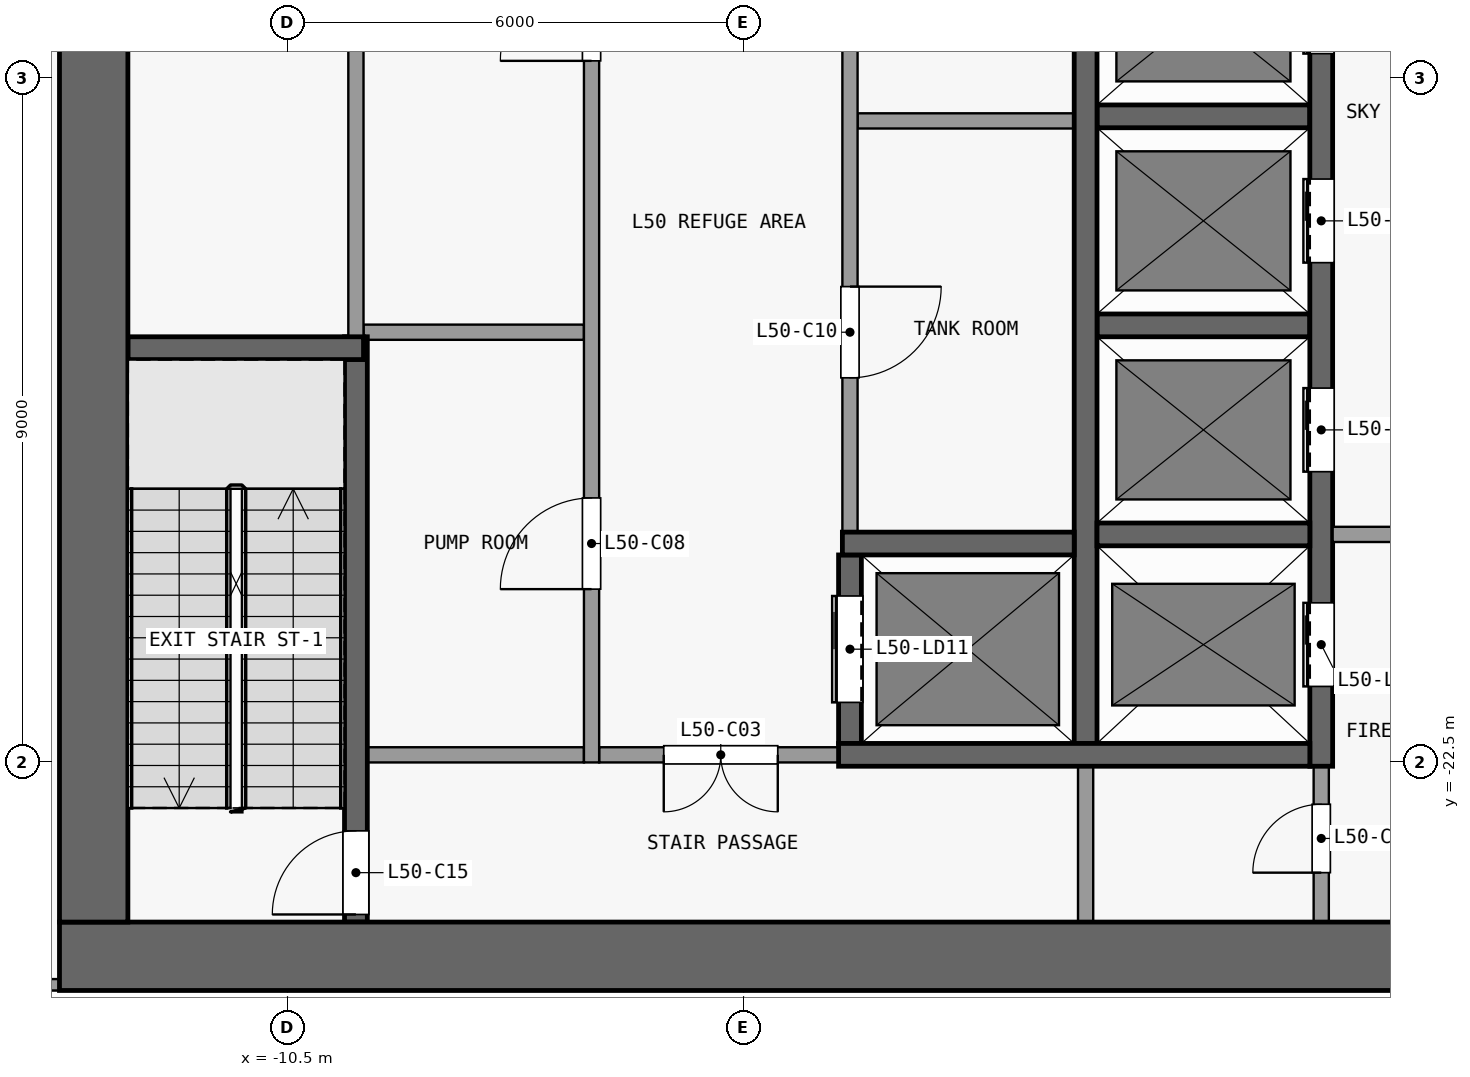
"""IFC4 building model, lengths in metres.
Left out: names, types, materials, properties, quantities, classifications, styles, units other than length and angle.
Written with IfcOpenShell. Run it as: python <this file> out.ifc"""

import sys

from ifc_helpers import new_model, si_unit, direction, frame, frame_2d, origin, place, context, subcontext, project, spatial, rectangle, extrude, element, fill, save


model = new_model("IFC4")
c1 = context("Model", 3, precision=1e-05, world=origin(), true_north=direction((0.0, 1.0)))
c2 = subcontext(c1, "Body", "Model", "MODEL_VIEW")
j1 = project(units=[si_unit("LENGTHUNIT", "METRE"), si_unit("PLANEANGLEUNIT", "RADIAN")], contexts=[c1])
p1 = place(None, origin())
s1 = spatial("IfcSite", under=j1, at=p1, CompositionType="ELEMENT")
p2 = place(p1, origin())
s2 = spatial("IfcBuilding", under=s1, at=p2, CompositionType="ELEMENT")
p3 = place(p2, frame((0.0, 0.0, 199.7)))
s3 = spatial("IfcBuildingStorey", under=s2, at=p3, CompositionType="ELEMENT", Elevation=199.7)
p4 = place(p3, frame((-13.5, -25.05, 0.0), z_axis=(0.0, 0.0, 1.0), x_axis=(1.0, 0.0, 0.0)))
e1 = element("IfcWall", 1, at=p4, inside=s3, PredefinedType="SHEAR", context=c2, shape_type="SweptSolid", body=[
    extrude(rectangle(XDim=27.0, YDim=0.9, at=frame_2d((13.5, 0.0))), origin(), (0.0, 0.0, 1.0), 5.0),
])
p5 = place(p3, frame((-13.05, -24.6, 0.0), z_axis=(0.0, 0.0, 1.0), x_axis=(0.0, 1.0, 0.0)))
e2 = element("IfcWall", 2, at=p5, inside=s3, PredefinedType="SHEAR", context=c2, shape_type="SweptSolid", body=[
    extrude(rectangle(XDim=16.1, YDim=0.9, at=frame_2d((8.05, 0.0))), origin(), (0.0, 0.0, 1.0), 5.0),
])
p6 = place(p3, frame((-9.45, -22.4, 0.0), z_axis=(0.0, 0.0, 1.0), x_axis=(1.0, 0.0, 0.0)))
e3 = element("IfcWall", 3, at=p6, inside=s3, PredefinedType="PARTITIONING", context=c2, shape_type="SweptSolid", body=[
    extrude(rectangle(XDim=2.85, YDim=0.2, at=frame_2d((1.425, 0.0))), origin(), (0.0, 0.0, 1.0), 5.0),
])
p7 = place(p3, frame((-3.25, -22.4, 0.0), z_axis=(0.0, 0.0, 1.0), x_axis=(-1.0, 0.0, 0.0)))
e4 = element("IfcWall", 4, at=p7, inside=s3, PredefinedType="PARTITIONING", context=c2, shape_type="SweptSolid", body=[
    extrude(rectangle(XDim=3.15, YDim=0.2, at=frame_2d((1.575, 0.0))), origin(), (0.0, 0.0, 1.0), 5.0),
])
p8 = place(p7, frame((0.8, 0.0, 0.0)))
e5 = element("IfcOpeningElement", 5, at=p8, cuts=e4, PredefinedType="OPENING", context=c2, shape_type="SweptSolid", body=[
    extrude(rectangle(XDim=1.5, YDim=2.1, at=frame_2d((0.75, 1.05))), frame((0.0, 0.11, 0.0), z_axis=(0.0, -1.0, 0.0), x_axis=(1.0, 0.0, 0.0)), (0.0, 0.0, 1.0), 0.22),
])
p9 = place(p3, frame((-3.25, -22.4, 0.0), z_axis=(0.0, 0.0, 1.0), x_axis=(1.0, 0.0, 0.0)))
e6 = element("IfcWall", 6, at=p9, inside=s3, PredefinedType="SHEAR", context=c2, shape_type="SweptSolid", body=[
    extrude(rectangle(XDim=6.2, YDim=0.3, at=frame_2d((3.1, 0.0))), origin(), (0.0, 0.0, 1.0), 5.0),
])
p10 = place(p3, frame((-3.2, -19.62, 0.0), z_axis=(0.0, 0.0, 1.0), x_axis=(1.0, 0.0, 0.0)))
e7 = element("IfcWall", 7, at=p10, inside=s3, PredefinedType="SHEAR", context=c2, shape_type="SweptSolid", body=[
    extrude(rectangle(XDim=3.05, YDim=0.3, at=frame_2d((1.525, 0.0))), origin(), (0.0, 0.0, 1.0), 5.0),
])
p11 = place(p3, frame((0.15, -19.5, 0.0), z_axis=(0.0, 0.0, 1.0), x_axis=(1.0, 0.0, 0.0)))
e8 = element("IfcWall", 8, at=p11, inside=s3, PredefinedType="SHEAR", context=c2, shape_type="SweptSolid", body=[
    extrude(rectangle(XDim=2.8, YDim=0.3, at=frame_2d((1.4, 0.0))), origin(), (0.0, 0.0, 1.0), 5.0),
])
p12 = place(p3, frame((6.35, -19.5, 0.0), z_axis=(0.0, 0.0, 1.0), x_axis=(-1.0, 0.0, 0.0)))
e9 = element("IfcWall", 9, at=p12, inside=s3, PredefinedType="PARTITIONING", context=c2, shape_type="SweptSolid", body=[
    extrude(rectangle(XDim=3.1, YDim=0.2, at=frame_2d((1.55, 0.0))), origin(), (0.0, 0.0, 1.0), 5.0),
])
p13 = place(p12, frame((0.8, 0.0, 0.0)))
e10 = element("IfcOpeningElement", 10, at=p13, cuts=e9, PredefinedType="OPENING", context=c2, shape_type="SweptSolid", body=[
    extrude(rectangle(XDim=1.5, YDim=2.1, at=frame_2d((0.75, 1.05))), frame((0.0, 0.11, 0.0), z_axis=(0.0, -1.0, 0.0), x_axis=(1.0, 0.0, 0.0)), (0.0, 0.0, 1.0), 0.22),
])
p14 = place(p3, frame((-12.6, -17.05, 0.0), z_axis=(0.0, 0.0, 1.0), x_axis=(1.0, 0.0, 0.0)))
e11 = element("IfcWall", 11, at=p14, inside=s3, PredefinedType="SHEAR", context=c2, shape_type="SweptSolid", body=[
    extrude(rectangle(XDim=3.1, YDim=0.3, at=frame_2d((1.55, 0.0))), origin(), (0.0, 0.0, 1.0), 5.0),
])
p15 = place(p3, frame((-9.5, -16.84, 0.0), z_axis=(0.0, 0.0, 1.0), x_axis=(1.0, 0.0, 0.0)))
e12 = element("IfcWall", 12, at=p15, inside=s3, PredefinedType="PARTITIONING", context=c2, shape_type="SweptSolid", body=[
    extrude(rectangle(XDim=2.9, YDim=0.2, at=frame_2d((1.45, 0.0))), origin(), (0.0, 0.0, 1.0), 5.0),
])
p16 = place(p3, frame((0.15, -16.75, 0.0), z_axis=(0.0, 0.0, 1.0), x_axis=(1.0, 0.0, 0.0)))
e13 = element("IfcWall", 13, at=p16, inside=s3, PredefinedType="SHEAR", context=c2, shape_type="SweptSolid", body=[
    extrude(rectangle(XDim=2.8, YDim=0.3, at=frame_2d((1.4, 0.0))), origin(), (0.0, 0.0, 1.0), 5.0),
])
p17 = place(p3, frame((-3.0, -14.06, 0.0), z_axis=(0.0, 0.0, 1.0), x_axis=(1.0, 0.0, 0.0)))
e14 = element("IfcWall", 14, at=p17, inside=s3, PredefinedType="PARTITIONING", context=c2, shape_type="SweptSolid", body=[
    extrude(rectangle(XDim=2.85, YDim=0.2, at=frame_2d((1.425, 0.0))), origin(), (0.0, 0.0, 1.0), 5.0),
])
p18 = place(p3, frame((0.15, -14.0, 0.0), z_axis=(0.0, 0.0, 1.0), x_axis=(1.0, 0.0, 0.0)))
e15 = element("IfcWall", 15, at=p18, inside=s3, PredefinedType="SHEAR", context=c2, shape_type="SweptSolid", body=[
    extrude(rectangle(XDim=2.8, YDim=0.3, at=frame_2d((1.4, 0.0))), origin(), (0.0, 0.0, 1.0), 5.0),
])
p19 = place(p3, frame((-9.6, -24.6, 0.0), z_axis=(0.0, 0.0, 1.0), x_axis=(0.0, 1.0, 0.0)))
e16 = element("IfcWall", 16, at=p19, inside=s3, PredefinedType="SHEAR", context=c2, shape_type="SweptSolid", body=[
    extrude(rectangle(XDim=7.7, YDim=0.3, at=frame_2d((3.85, 0.0))), origin(), (0.0, 0.0, 1.0), 5.0),
])
p20 = place(p19, frame((0.1, 0.0, 0.0)))
e17 = element("IfcOpeningElement", 17, at=p20, cuts=e16, PredefinedType="OPENING", context=c2, shape_type="SweptSolid", body=[
    extrude(rectangle(XDim=1.1, YDim=2.1, at=frame_2d((0.55, 1.05))), frame((0.0, 0.16, 0.0), z_axis=(0.0, -1.0, 0.0), x_axis=(1.0, 0.0, 0.0)), (0.0, 0.0, 1.0), 0.32),
])
p21 = place(p3, frame((-9.6, -16.9, 0.0), z_axis=(0.0, 0.0, 1.0), x_axis=(0.0, 1.0, 0.0)))
e18 = element("IfcWall", 18, at=p21, inside=s3, PredefinedType="PARTITIONING", context=c2, shape_type="SweptSolid", body=[
    extrude(rectangle(XDim=8.4, YDim=0.2, at=frame_2d((4.2, 0.0))), origin(), (0.0, 0.0, 1.0), 5.0),
])
p22 = place(p3, frame((-6.5, -22.5, 0.0), z_axis=(0.0, 0.0, 1.0), x_axis=(0.0, 1.0, 0.0)))
e19 = element("IfcWall", 19, at=p22, inside=s3, PredefinedType="PARTITIONING", context=c2, shape_type="SweptSolid", body=[
    extrude(rectangle(XDim=14.0, YDim=0.2, at=frame_2d((7.0, 0.0))), origin(), (0.0, 0.0, 1.0), 5.0),
])
p23 = place(p22, frame((2.28, 0.0, 0.0)))
e20 = element("IfcOpeningElement", 20, at=p23, cuts=e19, PredefinedType="OPENING", context=c2, shape_type="SweptSolid", body=[
    extrude(rectangle(XDim=1.2, YDim=2.1, at=frame_2d((0.6, 1.05))), frame((0.0, 0.11, 0.0), z_axis=(0.0, -1.0, 0.0), x_axis=(1.0, 0.0, 0.0)), (0.0, 0.0, 1.0), 0.22),
])
p24 = place(p22, frame((9.23, 0.0, 0.0)))
e21 = element("IfcOpeningElement", 21, at=p24, cuts=e19, PredefinedType="OPENING", context=c2, shape_type="SweptSolid", body=[
    extrude(rectangle(XDim=1.2, YDim=2.1, at=frame_2d((0.6, 1.05))), frame((0.0, 0.11, 0.0), z_axis=(0.0, -1.0, 0.0), x_axis=(1.0, 0.0, 0.0)), (0.0, 0.0, 1.0), 0.22),
])
p25 = place(p3, frame((-3.1, -22.25, 0.0), z_axis=(0.0, 0.0, 1.0), x_axis=(0.0, 1.0, 0.0)))
e22 = element("IfcWall", 22, at=p25, inside=s3, PredefinedType="SHEAR", context=c2, shape_type="SweptSolid", body=[
    extrude(rectangle(XDim=2.48, YDim=0.3, at=frame_2d((1.24, 0.0))), origin(), (0.0, 0.0, 1.0), 5.0),
])
p26 = place(p25, frame((0.54, 0.0, 0.0)))
e23 = element("IfcOpeningElement", 23, at=p26, cuts=e22, PredefinedType="OPENING", context=c2, shape_type="SweptSolid", body=[
    extrude(rectangle(XDim=1.4, YDim=2.1, at=frame_2d((0.7, 1.05))), frame((0.0, 0.16, 0.0), z_axis=(0.0, -1.0, 0.0), x_axis=(1.0, 0.0, 0.0)), (0.0, 0.0, 1.0), 0.32),
])
p27 = place(p3, frame((-3.1, -8.5, 0.0), z_axis=(0.0, 0.0, 1.0), x_axis=(0.0, -1.0, 0.0)))
e24 = element("IfcWall", 24, at=p27, inside=s3, PredefinedType="PARTITIONING", context=c2, shape_type="SweptSolid", body=[
    extrude(rectangle(XDim=10.97, YDim=0.2, at=frame_2d((5.485, 0.0))), origin(), (0.0, 0.0, 1.0), 5.0),
])
p28 = place(p27, frame((7.74, 0.0, 0.0)))
e25 = element("IfcOpeningElement", 25, at=p28, cuts=e24, PredefinedType="OPENING", context=c2, shape_type="SweptSolid", body=[
    extrude(rectangle(XDim=1.2, YDim=2.1, at=frame_2d((0.6, 1.05))), frame((0.0, 0.11, 0.0), z_axis=(0.0, -1.0, 0.0), x_axis=(1.0, 0.0, 0.0)), (0.0, 0.0, 1.0), 0.22),
])
p29 = place(p27, frame((2.18, 0.0, 0.0)))
e26 = element("IfcOpeningElement", 26, at=p29, cuts=e24, PredefinedType="OPENING", context=c2, shape_type="SweptSolid", body=[
    extrude(rectangle(XDim=1.2, YDim=2.1, at=frame_2d((0.6, 1.05))), frame((0.0, 0.11, 0.0), z_axis=(0.0, -1.0, 0.0), x_axis=(1.0, 0.0, 0.0)), (0.0, 0.0, 1.0), 0.22),
])
p30 = place(p3, frame((0.0, -24.6, 0.0), z_axis=(0.0, 0.0, 1.0), x_axis=(0.0, 1.0, 0.0)))
e27 = element("IfcWall", 27, at=p30, inside=s3, PredefinedType="PARTITIONING", context=c2, shape_type="SweptSolid", body=[
    extrude(rectangle(XDim=2.05, YDim=0.2, at=frame_2d((1.025, 0.0))), origin(), (0.0, 0.0, 1.0), 5.0),
])
p31 = place(p3, frame((0.0, -22.25, 0.0), z_axis=(0.0, 0.0, 1.0), x_axis=(0.0, 1.0, 0.0)))
e28 = element("IfcWall", 28, at=p31, inside=s3, PredefinedType="SHEAR", context=c2, shape_type="SweptSolid", body=[
    extrude(rectangle(XDim=13.75, YDim=0.3, at=frame_2d((6.875, 0.0))), origin(), (0.0, 0.0, 1.0), 5.0),
])
p32 = place(p3, frame((3.1, -24.6, 0.0), z_axis=(0.0, 0.0, 1.0), x_axis=(0.0, 1.0, 0.0)))
e29 = element("IfcWall", 29, at=p32, inside=s3, PredefinedType="PARTITIONING", context=c2, shape_type="SweptSolid", body=[
    extrude(rectangle(XDim=2.05, YDim=0.2, at=frame_2d((1.025, 0.0))), origin(), (0.0, 0.0, 1.0), 5.0),
])
p33 = place(p32, frame((0.65, 0.0, 0.0)))
e30 = element("IfcOpeningElement", 30, at=p33, cuts=e29, PredefinedType="OPENING", context=c2, shape_type="SweptSolid", body=[
    extrude(rectangle(XDim=0.9, YDim=2.1, at=frame_2d((0.45, 1.05))), frame((0.0, 0.11, 0.0), z_axis=(0.0, -1.0, 0.0), x_axis=(1.0, 0.0, 0.0)), (0.0, 0.0, 1.0), 0.22),
])
p34 = place(p3, frame((3.1, -22.55, 0.0), z_axis=(0.0, 0.0, 1.0), x_axis=(0.0, 1.0, 0.0)))
e31 = element("IfcWall", 31, at=p34, inside=s3, PredefinedType="SHEAR", context=c2, shape_type="SweptSolid", body=[
    extrude(rectangle(XDim=14.05, YDim=0.3, at=frame_2d((7.025, 0.0))), origin(), (0.0, 0.0, 1.0), 5.0),
])
p35 = place(p34, frame((1.05, 0.0, 0.0)))
e32 = element("IfcOpeningElement", 32, at=p35, cuts=e31, PredefinedType="OPENING", context=c2, shape_type="SweptSolid", body=[
    extrude(rectangle(XDim=1.1, YDim=2.1, at=frame_2d((0.55, 1.05))), frame((0.0, 0.16, 0.0), z_axis=(0.0, -1.0, 0.0), x_axis=(1.0, 0.0, 0.0)), (0.0, 0.0, 1.0), 0.32),
])
p36 = place(p34, frame((3.875, 0.0, 0.0)))
e33 = element("IfcOpeningElement", 33, at=p36, cuts=e31, PredefinedType="OPENING", context=c2, shape_type="SweptSolid", body=[
    extrude(rectangle(XDim=1.1, YDim=2.1, at=frame_2d((0.55, 1.05))), frame((0.0, 0.16, 0.0), z_axis=(0.0, -1.0, 0.0), x_axis=(1.0, 0.0, 0.0)), (0.0, 0.0, 1.0), 0.32),
])
p37 = place(p34, frame((6.625, 0.0, 0.0)))
e34 = element("IfcOpeningElement", 34, at=p37, cuts=e31, PredefinedType="OPENING", context=c2, shape_type="SweptSolid", body=[
    extrude(rectangle(XDim=1.1, YDim=2.1, at=frame_2d((0.55, 1.05))), frame((0.0, 0.16, 0.0), z_axis=(0.0, -1.0, 0.0), x_axis=(1.0, 0.0, 0.0)), (0.0, 0.0, 1.0), 0.32),
])
p38 = place(p34, frame((9.375, 0.0, 0.0)))
e35 = element("IfcOpeningElement", 35, at=p38, cuts=e31, PredefinedType="OPENING", context=c2, shape_type="SweptSolid", body=[
    extrude(rectangle(XDim=1.1, YDim=2.1, at=frame_2d((0.55, 1.05))), frame((0.0, 0.16, 0.0), z_axis=(0.0, -1.0, 0.0), x_axis=(1.0, 0.0, 0.0)), (0.0, 0.0, 1.0), 0.32),
])
p39 = place(p34, frame((12.125, 0.0, 0.0)))
e36 = element("IfcOpeningElement", 36, at=p39, cuts=e31, PredefinedType="OPENING", context=c2, shape_type="SweptSolid", body=[
    extrude(rectangle(XDim=1.1, YDim=2.1, at=frame_2d((0.55, 1.05))), frame((0.0, 0.16, 0.0), z_axis=(0.0, -1.0, 0.0), x_axis=(1.0, 0.0, 0.0)), (0.0, 0.0, 1.0), 0.32),
])
p40 = place(p3, frame((-13.5, -25.425, 0.0), z_axis=(0.0, 0.0, 1.0), x_axis=(-1.0, 0.0, 0.0)))
e37 = element("IfcWall", 37, at=p40, inside=s3, PredefinedType="SOLIDWALL", context=c2, shape_type="SweptSolid", body=[
    extrude(rectangle(XDim=2.0, YDim=0.15, at=frame_2d((1.0, 0.0))), origin(), (0.0, 0.0, 1.0), 5.0),
])
p41 = place(p35, origin())
e38 = element("IfcDoor", 38, at=p41, inside=s3, OperationType="DOUBLE_DOOR_SLIDING", PredefinedType="DOOR", context=c2, shape_type="SweptSolid", body=[
    extrude(rectangle(XDim=1.1, YDim=2.1, at=frame_2d((0.55, 1.05))), frame((0.0, 0.025, 0.0), z_axis=(0.0, -1.0, 0.0), x_axis=(1.0, 0.0, 0.0)), (0.0, 0.0, 1.0), 0.05),
])
fill(e32, e38)
p42 = place(p36, origin())
e39 = element("IfcDoor", 39, at=p42, inside=s3, OperationType="DOUBLE_DOOR_SLIDING", PredefinedType="DOOR", context=c2, shape_type="SweptSolid", body=[
    extrude(rectangle(XDim=1.1, YDim=2.1, at=frame_2d((0.55, 1.05))), frame((0.0, 0.025, 0.0), z_axis=(0.0, -1.0, 0.0), x_axis=(1.0, 0.0, 0.0)), (0.0, 0.0, 1.0), 0.05),
])
fill(e33, e39)
p43 = place(p37, origin())
e40 = element("IfcDoor", 40, at=p43, inside=s3, OperationType="DOUBLE_DOOR_SLIDING", PredefinedType="DOOR", context=c2, shape_type="SweptSolid", body=[
    extrude(rectangle(XDim=1.1, YDim=2.1, at=frame_2d((0.55, 1.05))), frame((0.0, 0.025, 0.0), z_axis=(0.0, -1.0, 0.0), x_axis=(1.0, 0.0, 0.0)), (0.0, 0.0, 1.0), 0.05),
])
fill(e34, e40)
p44 = place(p38, origin())
e41 = element("IfcDoor", 41, at=p44, inside=s3, OperationType="DOUBLE_DOOR_SLIDING", PredefinedType="DOOR", context=c2, shape_type="SweptSolid", body=[
    extrude(rectangle(XDim=1.1, YDim=2.1, at=frame_2d((0.55, 1.05))), frame((0.0, 0.025, 0.0), z_axis=(0.0, -1.0, 0.0), x_axis=(1.0, 0.0, 0.0)), (0.0, 0.0, 1.0), 0.05),
])
fill(e35, e41)
p45 = place(p26, origin())
e42 = element("IfcDoor", 42, at=p45, inside=s3, OperationType="DOUBLE_DOOR_SLIDING", PredefinedType="DOOR", context=c2, shape_type="SweptSolid", body=[
    extrude(rectangle(XDim=1.4, YDim=2.1, at=frame_2d((0.7, 1.05))), frame((0.0, 0.025, 0.0), z_axis=(0.0, -1.0, 0.0), x_axis=(1.0, 0.0, 0.0)), (0.0, 0.0, 1.0), 0.05),
])
fill(e23, e42)
p46 = place(p8, origin())
e43 = element("IfcDoor", 43, at=p46, inside=s3, OperationType="DOUBLE_DOOR_SINGLE_SWING", PredefinedType="DOOR", context=c2, shape_type="SweptSolid", body=[
    extrude(rectangle(XDim=1.5, YDim=2.1, at=frame_2d((0.75, 1.05))), frame((0.0, 0.025, 0.0), z_axis=(0.0, -1.0, 0.0), x_axis=(1.0, 0.0, 0.0)), (0.0, 0.0, 1.0), 0.05),
])
fill(e5, e43)
p47 = place(p33, origin())
e44 = element("IfcDoor", 44, at=p47, inside=s3, OperationType="SINGLE_SWING_LEFT", PredefinedType="DOOR", context=c2, shape_type="SweptSolid", body=[
    extrude(rectangle(XDim=0.9, YDim=2.1, at=frame_2d((0.45, 1.05))), frame((0.0, 0.025, 0.0), z_axis=(0.0, -1.0, 0.0), x_axis=(1.0, 0.0, 0.0)), (0.0, 0.0, 1.0), 0.05),
])
fill(e30, e44)
p48 = place(p23, origin())
e45 = element("IfcDoor", 45, at=p48, inside=s3, OperationType="SINGLE_SWING_LEFT", PredefinedType="DOOR", context=c2, shape_type="SweptSolid", body=[
    extrude(rectangle(XDim=1.2, YDim=2.1, at=frame_2d((0.6, 1.05))), frame((0.0, 0.025, 0.0), z_axis=(0.0, -1.0, 0.0), x_axis=(1.0, 0.0, 0.0)), (0.0, 0.0, 1.0), 0.05),
])
fill(e20, e45)
p49 = place(p24, origin())
e46 = element("IfcDoor", 46, at=p49, inside=s3, OperationType="SINGLE_SWING_LEFT", PredefinedType="DOOR", context=c2, shape_type="SweptSolid", body=[
    extrude(rectangle(XDim=1.2, YDim=2.1, at=frame_2d((0.6, 1.05))), frame((0.0, 0.025, 0.0), z_axis=(0.0, -1.0, 0.0), x_axis=(1.0, 0.0, 0.0)), (0.0, 0.0, 1.0), 0.05),
])
fill(e21, e46)
p50 = place(p28, origin())
e47 = element("IfcDoor", 47, at=p50, inside=s3, OperationType="SINGLE_SWING_LEFT", PredefinedType="DOOR", context=c2, shape_type="SweptSolid", body=[
    extrude(rectangle(XDim=1.2, YDim=2.1, at=frame_2d((0.6, 1.05))), frame((0.0, 0.025, 0.0), z_axis=(0.0, -1.0, 0.0), x_axis=(1.0, 0.0, 0.0)), (0.0, 0.0, 1.0), 0.05),
])
fill(e25, e47)
p51 = place(p20, origin())
e48 = element("IfcDoor", 48, at=p51, inside=s3, OperationType="SINGLE_SWING_LEFT", PredefinedType="DOOR", context=c2, shape_type="SweptSolid", body=[
    extrude(rectangle(XDim=1.1, YDim=2.1, at=frame_2d((0.55, 1.05))), frame((0.0, 0.025, 0.0), z_axis=(0.0, -1.0, 0.0), x_axis=(1.0, 0.0, 0.0)), (0.0, 0.0, 1.0), 0.05),
])
fill(e17, e48)
save(model, sys.argv[1])
